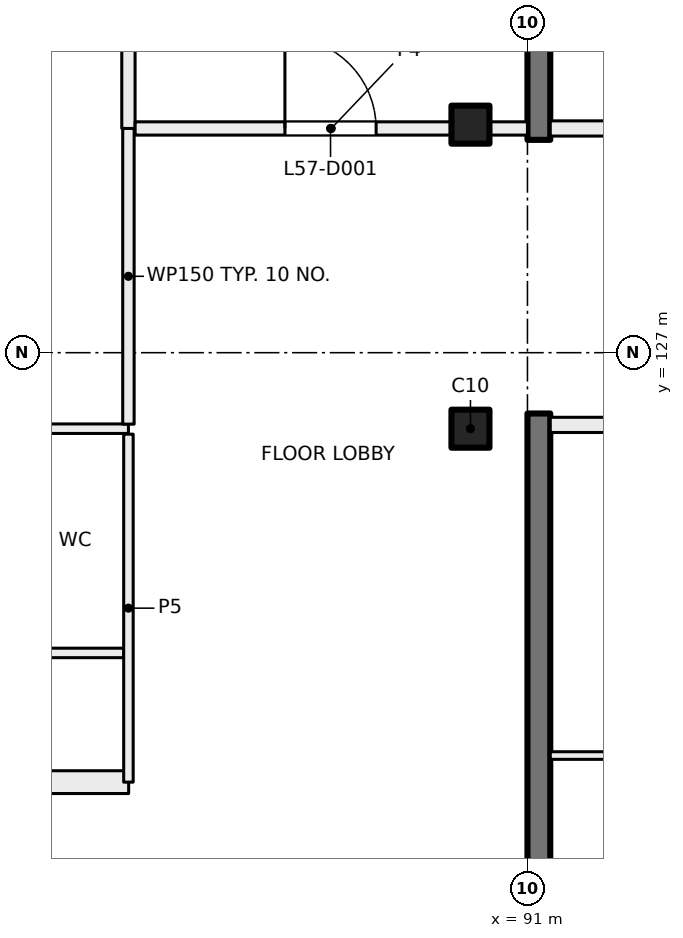
"""IFC4 building model, lengths in metres.
Left out: names, types, materials, properties, quantities, classifications, styles, units other than length and angle.
Written with IfcOpenShell. Run it as: python <this file> out.ifc"""

import sys

from ifc_helpers import new_model, si_unit, direction, frame, frame_2d, origin, origin_2d, place, context, subcontext, project, spatial, rectangle, extrude, element, fill, save


model = new_model("IFC4")
c1 = context("Model", 3, precision=1e-05, world=origin(), true_north=direction((0.0, 1.0)))
c2 = subcontext(c1, "Body", "Model", "MODEL_VIEW")
j1 = project(units=[si_unit("LENGTHUNIT", "METRE"), si_unit("PLANEANGLEUNIT", "RADIAN")], contexts=[c1])
p1 = place(None, origin())
s1 = spatial("IfcSite", under=j1, at=p1, CompositionType="ELEMENT")
p2 = place(p1, origin())
s2 = spatial("IfcBuilding", under=s1, at=p2, CompositionType="ELEMENT")
p3 = place(p2, frame((0.0, 0.0, 241.5)))
s3 = spatial("IfcBuildingStorey", under=s2, at=p3, CompositionType="ELEMENT", Elevation=241.5)
for number, where, z_axis, x_axis in (
    (1, (90.25, 130.0, 0.0), (0.0, 0.0, 1.0), (1.0, 0.0, 0.0)),
    (2, (90.25, 126.0, 0.0), (0.0, 0.0, 1.0), (1.0, 0.0, 0.0)),
):
    element("IfcColumn", number, at=place(p3, frame(where, z_axis=z_axis, x_axis=x_axis)), inside=s3, PredefinedType="COLUMN", context=c2, shape_type="SweptSolid", body=[
        extrude(rectangle(XDim=0.5, YDim=0.5, at=origin_2d()), origin(), (0.0, 0.0, 1.0), 4.0),
    ])
for number, where, z_axis, x_axis in (
    (3, (91.15, 138.55, 0.0), (0.0, 0.0, 1.0), (0.0, -1.0, 0.0)),
    (4, (91.15, 126.2, 0.0), (0.0, 0.0, 1.0), (0.0, -1.0, 0.0)),
):
    element("IfcWall", number, at=place(p3, frame(where, z_axis=z_axis, x_axis=x_axis)), inside=s3, PredefinedType="SHEAR", context=c2, shape_type="SweptSolid", body=[
        extrude(rectangle(XDim=8.75, YDim=0.3, at=frame_2d((4.375, 0.0))), origin(), (0.0, 0.0, 1.0), 4.0),
    ])
p4 = place(p3, frame((95.25, 126.05, 0.0), z_axis=(0.0, 0.0, 1.0), x_axis=(-1.0, 0.0, 0.0)))
e5 = element("IfcWall", 5, at=p4, inside=s3, PredefinedType="PARTITIONING", context=c2, shape_type="SweptSolid", body=[
    extrude(rectangle(XDim=3.95, YDim=0.2, at=frame_2d((1.975, 0.0))), origin(), (0.0, 0.0, 1.0), 3.625),
])
p5 = place(p4, frame((0.3, 0.0, 0.0)))
e6 = element("IfcOpeningElement", 6, at=p5, cuts=e5, PredefinedType="OPENING", context=c2, shape_type="SweptSolid", body=[
    extrude(rectangle(XDim=1.2, YDim=2.1, at=frame_2d((0.6, 1.05))), frame((0.0, 0.11, 0.0), z_axis=(0.0, -1.0, 0.0), x_axis=(1.0, 0.0, 0.0)), (0.0, 0.0, 1.0), 0.22),
])
p6 = place(p3, frame((93.4, 121.7, 0.0), z_axis=(0.0, 0.0, 1.0), x_axis=(-1.0, 0.0, 0.0)))
e7 = element("IfcWall", 7, at=p6, inside=s3, PredefinedType="PARTITIONING", context=c2, shape_type="SweptSolid", body=[
    extrude(rectangle(XDim=2.1, YDim=0.1, at=frame_2d((1.05, 0.0))), origin(), (0.0, 0.0, 1.0), 3.625),
])
p7 = place(p3, frame((91.3, 129.95, 0.0), z_axis=(0.0, 0.0, 1.0), x_axis=(1.0, 0.0, 0.0)))
e8 = element("IfcWall", 8, at=p7, inside=s3, PredefinedType="PARTITIONING", context=c2, shape_type="SweptSolid", body=[
    extrude(rectangle(XDim=3.95, YDim=0.2, at=frame_2d((1.975, 0.0))), origin(), (0.0, 0.0, 1.0), 3.625),
])
p8 = place(p7, frame((2.45, 0.0, 0.0)))
e9 = element("IfcOpeningElement", 9, at=p8, cuts=e8, PredefinedType="OPENING", context=c2, shape_type="SweptSolid", body=[
    extrude(rectangle(XDim=1.2, YDim=2.1, at=frame_2d((0.6, 1.05))), frame((0.0, 0.11, 0.0), z_axis=(0.0, -1.0, 0.0), x_axis=(1.0, 0.0, 0.0)), (0.0, 0.0, 1.0), 0.22),
])
p9 = place(p3, frame((54.4, 121.35, 0.0), z_axis=(0.0, 0.0, 1.0), x_axis=(1.0, 0.0, 0.0)))
e10 = element("IfcWall", 10, at=p9, inside=s3, PredefinedType="PARTITIONING", context=c2, shape_type="SweptSolid", body=[
    extrude(rectangle(XDim=31.353, YDim=0.3, at=frame_2d((15.677, 0.0))), origin(), (0.0, 0.0, 1.0), 3.625),
])
p10 = place(p9, frame((26.35, 0.0, 0.0)))
e11 = element("IfcOpeningElement", 11, at=p10, cuts=e10, PredefinedType="OPENING", context=c2, shape_type="SweptSolid", body=[
    extrude(rectangle(XDim=1.0, YDim=2.1, at=frame_2d((0.5, 1.05))), frame((0.0, 0.16, 0.0), z_axis=(0.0, -1.0, 0.0), x_axis=(1.0, 0.0, 0.0)), (0.0, 0.0, 1.0), 0.32),
])
p11 = place(p9, frame((10.265, 0.0, 0.0)))
e12 = element("IfcOpeningElement", 12, at=p11, cuts=e10, PredefinedType="OPENING", context=c2, shape_type="SweptSolid", body=[
    extrude(rectangle(XDim=1.8, YDim=2.1, at=frame_2d((0.9, 1.05))), frame((0.0, 0.16, 0.0), z_axis=(0.0, -1.0, 0.0), x_axis=(1.0, 0.0, 0.0)), (0.0, 0.0, 1.0), 0.32),
])
p12 = place(p3, frame((76.812, 123.05, 0.0), z_axis=(0.0, 0.0, 1.0), x_axis=(1.0, 0.0, 0.0)))
e13 = element("IfcWall", 13, at=p12, inside=s3, PredefinedType="PARTITIONING", context=c2, shape_type="SweptSolid", body=[
    extrude(rectangle(XDim=8.876, YDim=0.125, at=frame_2d((4.438, 0.0))), origin(), (0.0, 0.0, 1.0), 3.625),
])
p13 = place(p12, frame((6.817, 0.0, 0.0)))
e14 = element("IfcOpeningElement", 14, at=p13, cuts=e13, PredefinedType="OPENING", context=c2, shape_type="SweptSolid", body=[
    extrude(rectangle(XDim=0.8, YDim=2.1, at=frame_2d((0.4, 1.05))), frame((0.0, 0.073, 0.0), z_axis=(0.0, -1.0, 0.0), x_axis=(1.0, 0.0, 0.0)), (0.0, 0.0, 1.0), 0.145),
])
p14 = place(p12, frame((3.638, 0.0, 0.0)))
e15 = element("IfcOpeningElement", 15, at=p14, cuts=e13, PredefinedType="OPENING", context=c2, shape_type="SweptSolid", body=[
    extrude(rectangle(XDim=0.8, YDim=2.1, at=frame_2d((0.4, 1.05))), frame((0.0, 0.073, 0.0), z_axis=(0.0, -1.0, 0.0), x_axis=(1.0, 0.0, 0.0)), (0.0, 0.0, 1.0), 0.145),
])
p15 = place(p12, frame((0.759, 0.0, 0.0)))
e16 = element("IfcOpeningElement", 16, at=p15, cuts=e13, PredefinedType="OPENING", context=c2, shape_type="SweptSolid", body=[
    extrude(rectangle(XDim=1.0, YDim=2.1, at=frame_2d((0.5, 1.05))), frame((0.0, 0.073, 0.0), z_axis=(0.0, -1.0, 0.0), x_axis=(1.0, 0.0, 0.0)), (0.0, 0.0, 1.0), 0.145),
])
p16 = place(p3, frame((76.688, 126.0, 0.0), z_axis=(0.0, 0.0, 1.0), x_axis=(1.0, 0.0, 0.0)))
e17 = element("IfcWall", 17, at=p16, inside=s3, PredefinedType="PARTITIONING", context=c2, shape_type="SweptSolid", body=[
    extrude(rectangle(XDim=9.062, YDim=0.125, at=frame_2d((4.531, 0.0))), origin(), (0.0, 0.0, 1.0), 3.625),
])
p17 = place(p3, frame((85.75, 121.35, 0.0), z_axis=(0.0, 0.0, 1.0), x_axis=(0.0, 1.0, 0.0)))
e18 = element("IfcWall", 18, at=p17, inside=s3, PredefinedType="PARTITIONING", context=c2, shape_type="SweptSolid", body=[
    extrude(rectangle(XDim=4.578, YDim=0.125, at=frame_2d((2.289, 0.0))), origin(), (0.0, 0.0, 1.0), 3.625),
])
p18 = place(p3, frame((85.75, 126.06, 0.0), z_axis=(0.0, 0.0, 1.0), x_axis=(0.0, 1.0, 0.0)))
e19 = element("IfcWall", 19, at=p18, inside=s3, PredefinedType="PARTITIONING", context=c2, shape_type="SweptSolid", body=[
    extrude(rectangle(XDim=3.89, YDim=0.15, at=frame_2d((1.945, 0.0))), origin(), (0.0, 0.0, 1.0), 3.625),
])
p19 = place(p3, frame((85.75, 129.95, 0.0), z_axis=(0.0, 0.0, 1.0), x_axis=(0.0, 1.0, 0.0)))
e20 = element("IfcWall", 20, at=p19, inside=s3, PredefinedType="PARTITIONING", context=c2, shape_type="SweptSolid", body=[
    extrude(rectangle(XDim=8.45, YDim=0.175, at=frame_2d((4.225, 0.0))), origin(), (0.0, 0.0, 1.0), 3.625),
])
p20 = place(p3, frame((85.838, 129.95, 0.0), z_axis=(0.0, 0.0, 1.0), x_axis=(1.0, 0.0, 0.0)))
e21 = element("IfcWall", 21, at=p20, inside=s3, PredefinedType="PARTITIONING", context=c2, shape_type="SweptSolid", body=[
    extrude(rectangle(XDim=5.162, YDim=0.175, at=frame_2d((2.581, 0.0))), origin(), (0.0, 0.0, 1.0), 3.625),
])
p21 = place(p20, frame((1.971, 0.0, 0.0)))
e22 = element("IfcOpeningElement", 22, at=p21, cuts=e21, PredefinedType="OPENING", context=c2, shape_type="SweptSolid", body=[
    extrude(rectangle(XDim=1.2, YDim=2.1, at=frame_2d((0.6, 1.05))), frame((0.0, 0.097, 0.0), z_axis=(0.0, -1.0, 0.0), x_axis=(1.0, 0.0, 0.0)), (0.0, 0.0, 1.0), 0.195),
])
p22 = place(p21, origin())
e23 = element("IfcDoor", 23, at=p22, inside=s3, OperationType="DOUBLE_DOOR_SINGLE_SWING", PredefinedType="DOOR", context=c2, shape_type="SweptSolid", body=[
    extrude(rectangle(XDim=1.2, YDim=2.1, at=frame_2d((0.6, 1.05))), frame((0.0, 0.025, 0.0), z_axis=(0.0, -1.0, 0.0), x_axis=(1.0, 0.0, 0.0)), (0.0, 0.0, 1.0), 0.05),
])
fill(e22, e23)
save(model, sys.argv[1])
